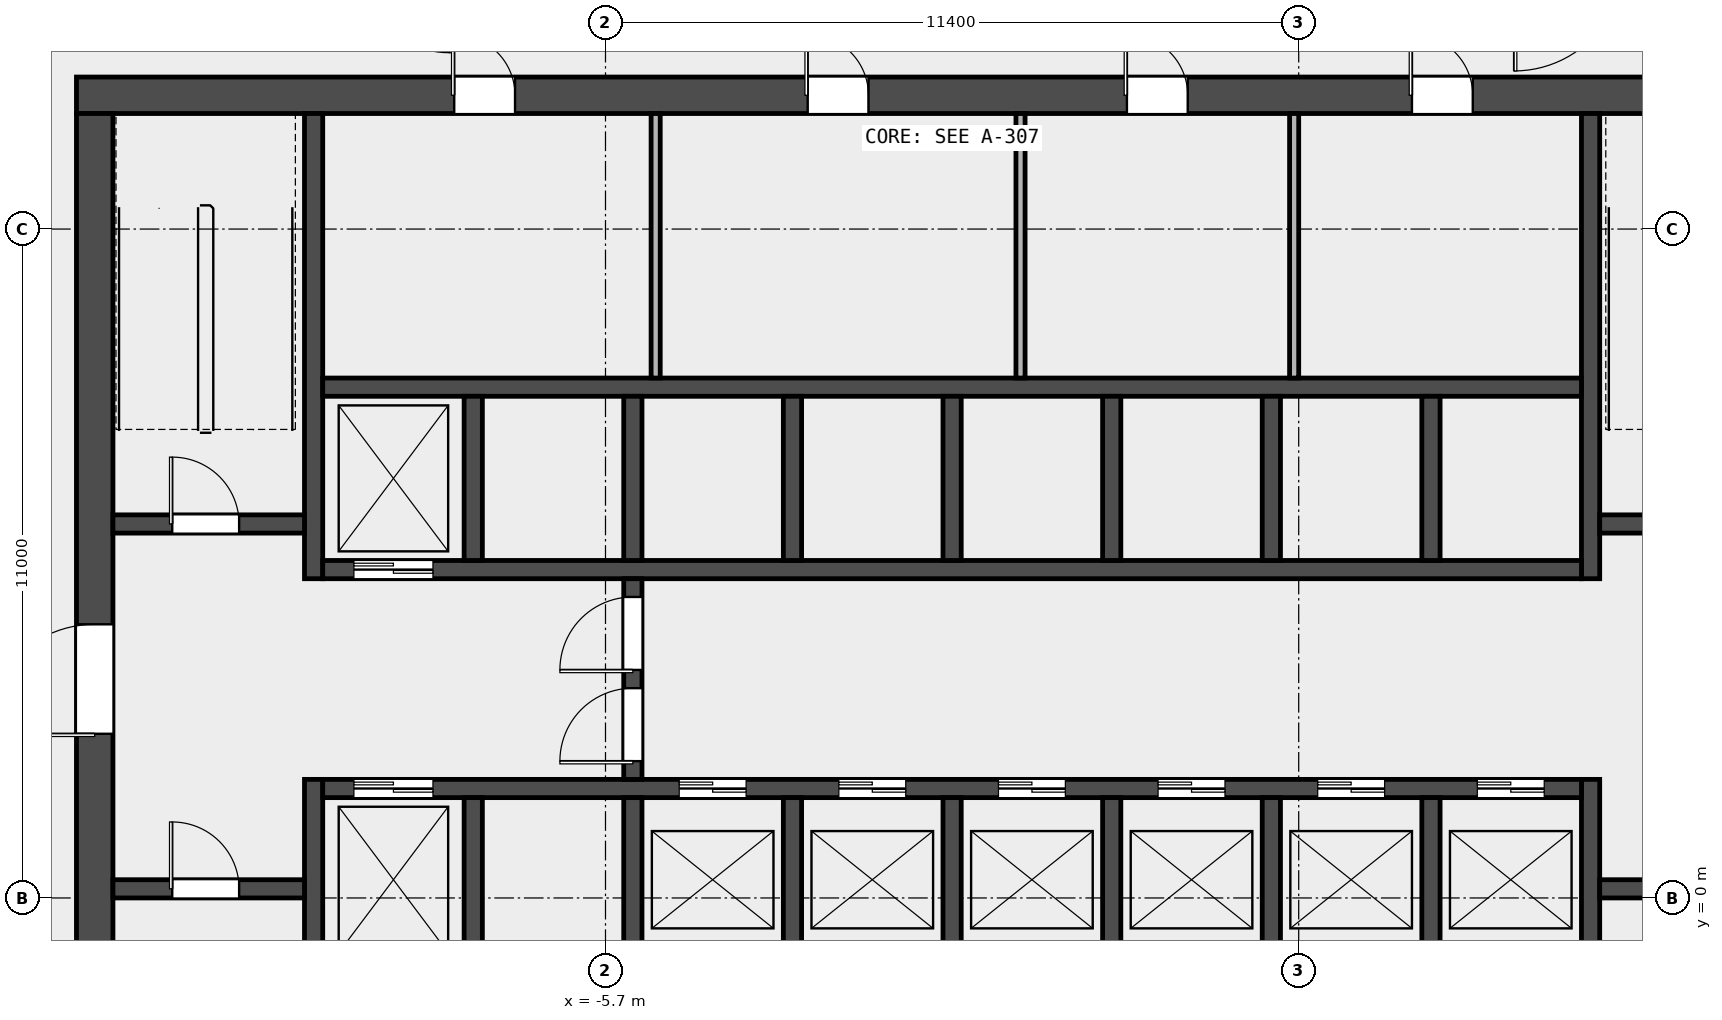
"""IFC4 building model, lengths in metres.
Left out: names, types, materials, properties, quantities, classifications, styles, units other than length and angle.
Written with IfcOpenShell. Run it as: python <this file> out.ifc"""

import sys

from ifc_helpers import new_model, si_unit, direction, frame, frame_2d, origin, place, context, subcontext, project, spatial, rectangle, extrude, element, fill, save


model = new_model("IFC4")
c1 = context("Model", 3, precision=1e-05, world=origin(), true_north=direction((0.0, 1.0)))
c2 = subcontext(c1, "Body", "Model", "MODEL_VIEW")
j1 = project(units=[si_unit("LENGTHUNIT", "METRE"), si_unit("PLANEANGLEUNIT", "RADIAN")], contexts=[c1])
p1 = place(None, origin())
s1 = spatial("IfcSite", under=j1, at=p1, CompositionType="ELEMENT")
p2 = place(p1, origin())
s2 = spatial("IfcBuilding", under=s1, at=p2, CompositionType="ELEMENT")
p3 = place(p2, frame((0.0, 0.0, 79.0)))
s3 = spatial("IfcBuildingStorey", under=s2, at=p3, CompositionType="ELEMENT", Elevation=79.0)
p4 = place(p3, frame((-14.4, 13.2, 0.0), z_axis=(0.0, 0.0, 1.0), x_axis=(1.0, 0.0, 0.0)))
e1 = element("IfcWall", 1, at=p4, inside=s3, PredefinedType="SHEAR", context=c2, shape_type="SweptSolid", body=[
    extrude(rectangle(XDim=28.8, YDim=0.6, at=frame_2d((14.4, 0.0))), origin(), (0.0, 0.0, 1.0), 4.5),
])
p5 = place(p4, frame((6.212, 0.0, 0.0)))
e2 = element("IfcOpeningElement", 2, at=p5, cuts=e1, PredefinedType="OPENING", context=c2, shape_type="SweptSolid", body=[
    extrude(rectangle(XDim=1.0, YDim=2.1, at=frame_2d((0.5, 1.05))), frame((0.0, 0.312, 0.0), z_axis=(0.0, -1.0, 0.0), x_axis=(1.0, 0.0, 0.0)), (0.0, 0.0, 1.0), 0.624),
])
p6 = place(p4, frame((12.025, 0.0, 0.0)))
e3 = element("IfcOpeningElement", 3, at=p6, cuts=e1, PredefinedType="OPENING", context=c2, shape_type="SweptSolid", body=[
    extrude(rectangle(XDim=1.0, YDim=2.1, at=frame_2d((0.5, 1.05))), frame((0.0, 0.312, 0.0), z_axis=(0.0, -1.0, 0.0), x_axis=(1.0, 0.0, 0.0)), (0.0, 0.0, 1.0), 0.624),
])
p7 = place(p4, frame((17.275, 0.0, 0.0)))
e4 = element("IfcOpeningElement", 4, at=p7, cuts=e1, PredefinedType="OPENING", context=c2, shape_type="SweptSolid", body=[
    extrude(rectangle(XDim=1.0, YDim=2.1, at=frame_2d((0.5, 1.05))), frame((0.0, 0.312, 0.0), z_axis=(0.0, -1.0, 0.0), x_axis=(1.0, 0.0, 0.0)), (0.0, 0.0, 1.0), 0.624),
])
p8 = place(p4, frame((21.962, 0.0, 0.0)))
e5 = element("IfcOpeningElement", 5, at=p8, cuts=e1, PredefinedType="OPENING", context=c2, shape_type="SweptSolid", body=[
    extrude(rectangle(XDim=1.0, YDim=2.1, at=frame_2d((0.5, 1.05))), frame((0.0, 0.312, 0.0), z_axis=(0.0, -1.0, 0.0), x_axis=(1.0, 0.0, 0.0)), (0.0, 0.0, 1.0), 0.624),
])
p9 = place(p3, frame((-14.1, -6.6, 0.0), z_axis=(0.0, 0.0, 1.0), x_axis=(0.0, 1.0, 0.0)))
e6 = element("IfcWall", 6, at=p9, inside=s3, PredefinedType="SHEAR", context=c2, shape_type="SweptSolid", body=[
    extrude(rectangle(XDim=19.5, YDim=0.6, at=frame_2d((9.75, 0.0))), origin(), (0.0, 0.0, 1.0), 4.5),
])
p10 = place(p9, frame((9.3, 0.0, 0.0)))
e7 = element("IfcOpeningElement", 7, at=p10, cuts=e6, PredefinedType="OPENING", context=c2, shape_type="SweptSolid", body=[
    extrude(rectangle(XDim=1.8, YDim=2.1, at=frame_2d((0.9, 1.05))), frame((0.0, 0.312, 0.0), z_axis=(0.0, -1.0, 0.0), x_axis=(1.0, 0.0, 0.0)), (0.0, 0.0, 1.0), 0.624),
])
p11 = place(p3, frame((-10.5, -6.6, 0.0), z_axis=(0.0, 0.0, 1.0), x_axis=(0.0, 1.0, 0.0)))
e8 = element("IfcWall", 8, at=p11, inside=s3, PredefinedType="SHEAR", context=c2, shape_type="SweptSolid", body=[
    extrude(rectangle(XDim=8.55, YDim=0.3, at=frame_2d((4.275, 0.0))), origin(), (0.0, 0.0, 1.0), 4.5),
])
p12 = place(p3, frame((-10.5, 5.25, 0.0), z_axis=(0.0, 0.0, 1.0), x_axis=(0.0, 1.0, 0.0)))
e9 = element("IfcWall", 9, at=p12, inside=s3, PredefinedType="SHEAR", context=c2, shape_type="SweptSolid", body=[
    extrude(rectangle(XDim=7.65, YDim=0.3, at=frame_2d((3.825, 0.0))), origin(), (0.0, 0.0, 1.0), 4.5),
])
p13 = place(p3, frame((10.5, -6.6, 0.0), z_axis=(0.0, 0.0, 1.0), x_axis=(0.0, 1.0, 0.0)))
e10 = element("IfcWall", 10, at=p13, inside=s3, PredefinedType="SHEAR", context=c2, shape_type="SweptSolid", body=[
    extrude(rectangle(XDim=8.55, YDim=0.3, at=frame_2d((4.275, 0.0))), origin(), (0.0, 0.0, 1.0), 4.5),
])
p14 = place(p3, frame((10.5, 5.25, 0.0), z_axis=(0.0, 0.0, 1.0), x_axis=(0.0, 1.0, 0.0)))
e11 = element("IfcWall", 11, at=p14, inside=s3, PredefinedType="SHEAR", context=c2, shape_type="SweptSolid", body=[
    extrude(rectangle(XDim=7.65, YDim=0.3, at=frame_2d((3.825, 0.0))), origin(), (0.0, 0.0, 1.0), 4.5),
])
p15 = place(p3, frame((-13.8, 0.15, 0.0), z_axis=(0.0, 0.0, 1.0), x_axis=(1.0, 0.0, 0.0)))
e12 = element("IfcWall", 12, at=p15, inside=s3, PredefinedType="SOLIDWALL", context=c2, shape_type="SweptSolid", body=[
    extrude(rectangle(XDim=3.15, YDim=0.3, at=frame_2d((1.575, 0.0))), origin(), (0.0, 0.0, 1.0), 4.5),
])
p16 = place(p15, frame((0.975, 0.0, 0.0)))
e13 = element("IfcOpeningElement", 13, at=p16, cuts=e12, PredefinedType="OPENING", context=c2, shape_type="SweptSolid", body=[
    extrude(rectangle(XDim=1.1, YDim=2.1, at=frame_2d((0.55, 1.05))), frame((0.0, 0.162, 0.0), z_axis=(0.0, -1.0, 0.0), x_axis=(1.0, 0.0, 0.0)), (0.0, 0.0, 1.0), 0.324),
])
p17 = place(p3, frame((-13.8, 6.15, 0.0), z_axis=(0.0, 0.0, 1.0), x_axis=(1.0, 0.0, 0.0)))
e14 = element("IfcWall", 14, at=p17, inside=s3, PredefinedType="SOLIDWALL", context=c2, shape_type="SweptSolid", body=[
    extrude(rectangle(XDim=3.15, YDim=0.3, at=frame_2d((1.575, 0.0))), origin(), (0.0, 0.0, 1.0), 4.5),
])
p18 = place(p17, frame((0.975, 0.0, 0.0)))
e15 = element("IfcOpeningElement", 15, at=p18, cuts=e14, PredefinedType="OPENING", context=c2, shape_type="SweptSolid", body=[
    extrude(rectangle(XDim=1.1, YDim=2.1, at=frame_2d((0.55, 1.05))), frame((0.0, 0.162, 0.0), z_axis=(0.0, -1.0, 0.0), x_axis=(1.0, 0.0, 0.0)), (0.0, 0.0, 1.0), 0.324),
])
p19 = place(p3, frame((10.65, 0.15, 0.0), z_axis=(0.0, 0.0, 1.0), x_axis=(1.0, 0.0, 0.0)))
e16 = element("IfcWall", 16, at=p19, inside=s3, PredefinedType="SOLIDWALL", context=c2, shape_type="SweptSolid", body=[
    extrude(rectangle(XDim=3.15, YDim=0.3, at=frame_2d((1.575, 0.0))), origin(), (0.0, 0.0, 1.0), 4.5),
])
p20 = place(p19, frame((1.025, 0.0, 0.0)))
e17 = element("IfcOpeningElement", 17, at=p20, cuts=e16, PredefinedType="OPENING", context=c2, shape_type="SweptSolid", body=[
    extrude(rectangle(XDim=1.1, YDim=2.1, at=frame_2d((0.55, 1.05))), frame((0.0, 0.162, 0.0), z_axis=(0.0, -1.0, 0.0), x_axis=(1.0, 0.0, 0.0)), (0.0, 0.0, 1.0), 0.324),
])
p21 = place(p3, frame((10.65, 6.15, 0.0), z_axis=(0.0, 0.0, 1.0), x_axis=(1.0, 0.0, 0.0)))
e18 = element("IfcWall", 18, at=p21, inside=s3, PredefinedType="SOLIDWALL", context=c2, shape_type="SweptSolid", body=[
    extrude(rectangle(XDim=3.15, YDim=0.3, at=frame_2d((1.575, 0.0))), origin(), (0.0, 0.0, 1.0), 4.5),
])
p22 = place(p21, frame((1.025, 0.0, 0.0)))
e19 = element("IfcOpeningElement", 19, at=p22, cuts=e18, PredefinedType="OPENING", context=c2, shape_type="SweptSolid", body=[
    extrude(rectangle(XDim=1.1, YDim=2.1, at=frame_2d((0.55, 1.05))), frame((0.0, 0.162, 0.0), z_axis=(0.0, -1.0, 0.0), x_axis=(1.0, 0.0, 0.0)), (0.0, 0.0, 1.0), 0.324),
])
p23 = place(p3, frame((-10.35, 1.8, 0.0), z_axis=(0.0, 0.0, 1.0), x_axis=(1.0, 0.0, 0.0)))
e20 = element("IfcWall", 20, at=p23, inside=s3, PredefinedType="SOLIDWALL", context=c2, shape_type="SweptSolid", body=[
    extrude(rectangle(XDim=20.7, YDim=0.3, at=frame_2d((10.35, 0.0))), origin(), (0.0, 0.0, 1.0), 4.5),
])
p24 = place(p23, frame((0.512, 0.0, 0.0)))
e21 = element("IfcOpeningElement", 21, at=p24, cuts=e20, PredefinedType="OPENING", context=c2, shape_type="SweptSolid", body=[
    extrude(rectangle(XDim=1.3, YDim=2.1, at=frame_2d((0.65, 1.05))), frame((0.0, 0.162, 0.0), z_axis=(0.0, -1.0, 0.0), x_axis=(1.0, 0.0, 0.0)), (0.0, 0.0, 1.0), 0.324),
])
p25 = place(p23, frame((5.863, 0.0, 0.0)))
e22 = element("IfcOpeningElement", 22, at=p25, cuts=e20, PredefinedType="OPENING", context=c2, shape_type="SweptSolid", body=[
    extrude(rectangle(XDim=1.1, YDim=2.1, at=frame_2d((0.55, 1.05))), frame((0.0, 0.162, 0.0), z_axis=(0.0, -1.0, 0.0), x_axis=(1.0, 0.0, 0.0)), (0.0, 0.0, 1.0), 0.324),
])
p26 = place(p23, frame((8.488, 0.0, 0.0)))
e23 = element("IfcOpeningElement", 23, at=p26, cuts=e20, PredefinedType="OPENING", context=c2, shape_type="SweptSolid", body=[
    extrude(rectangle(XDim=1.1, YDim=2.1, at=frame_2d((0.55, 1.05))), frame((0.0, 0.162, 0.0), z_axis=(0.0, -1.0, 0.0), x_axis=(1.0, 0.0, 0.0)), (0.0, 0.0, 1.0), 0.324),
])
p27 = place(p23, frame((11.113, 0.0, 0.0)))
e24 = element("IfcOpeningElement", 24, at=p27, cuts=e20, PredefinedType="OPENING", context=c2, shape_type="SweptSolid", body=[
    extrude(rectangle(XDim=1.1, YDim=2.1, at=frame_2d((0.55, 1.05))), frame((0.0, 0.162, 0.0), z_axis=(0.0, -1.0, 0.0), x_axis=(1.0, 0.0, 0.0)), (0.0, 0.0, 1.0), 0.324),
])
p28 = place(p23, frame((13.738, 0.0, 0.0)))
e25 = element("IfcOpeningElement", 25, at=p28, cuts=e20, PredefinedType="OPENING", context=c2, shape_type="SweptSolid", body=[
    extrude(rectangle(XDim=1.1, YDim=2.1, at=frame_2d((0.55, 1.05))), frame((0.0, 0.162, 0.0), z_axis=(0.0, -1.0, 0.0), x_axis=(1.0, 0.0, 0.0)), (0.0, 0.0, 1.0), 0.324),
])
p29 = place(p23, frame((16.363, 0.0, 0.0)))
e26 = element("IfcOpeningElement", 26, at=p29, cuts=e20, PredefinedType="OPENING", context=c2, shape_type="SweptSolid", body=[
    extrude(rectangle(XDim=1.1, YDim=2.1, at=frame_2d((0.55, 1.05))), frame((0.0, 0.162, 0.0), z_axis=(0.0, -1.0, 0.0), x_axis=(1.0, 0.0, 0.0)), (0.0, 0.0, 1.0), 0.324),
])
p30 = place(p23, frame((18.988, 0.0, 0.0)))
e27 = element("IfcOpeningElement", 27, at=p30, cuts=e20, PredefinedType="OPENING", context=c2, shape_type="SweptSolid", body=[
    extrude(rectangle(XDim=1.1, YDim=2.1, at=frame_2d((0.55, 1.05))), frame((0.0, 0.162, 0.0), z_axis=(0.0, -1.0, 0.0), x_axis=(1.0, 0.0, 0.0)), (0.0, 0.0, 1.0), 0.324),
])
p31 = place(p3, frame((-10.35, 5.4, 0.0), z_axis=(0.0, 0.0, 1.0), x_axis=(1.0, 0.0, 0.0)))
e28 = element("IfcWall", 28, at=p31, inside=s3, PredefinedType="SOLIDWALL", context=c2, shape_type="SweptSolid", body=[
    extrude(rectangle(XDim=20.7, YDim=0.3, at=frame_2d((10.35, 0.0))), origin(), (0.0, 0.0, 1.0), 4.5),
])
p32 = place(p31, frame((0.512, 0.0, 0.0)))
e29 = element("IfcOpeningElement", 29, at=p32, cuts=e28, PredefinedType="OPENING", context=c2, shape_type="SweptSolid", body=[
    extrude(rectangle(XDim=1.3, YDim=2.1, at=frame_2d((0.65, 1.05))), frame((0.0, 0.162, 0.0), z_axis=(0.0, -1.0, 0.0), x_axis=(1.0, 0.0, 0.0)), (0.0, 0.0, 1.0), 0.324),
])
p33 = place(p3, frame((-10.35, 8.4, 0.0), z_axis=(0.0, 0.0, 1.0), x_axis=(1.0, 0.0, 0.0)))
e30 = element("IfcWall", 30, at=p33, inside=s3, PredefinedType="SOLIDWALL", context=c2, shape_type="SweptSolid", body=[
    extrude(rectangle(XDim=20.7, YDim=0.3, at=frame_2d((10.35, 0.0))), origin(), (0.0, 0.0, 1.0), 4.5),
])
for number, where, z_axis, x_axis in (
    (31, (-7.875, -1.05, 0.0), (0.0, 0.0, 1.0), (0.0, 1.0, 0.0)),
    (32, (-5.25, -1.05, 0.0), (0.0, 0.0, 1.0), (0.0, 1.0, 0.0)),
    (33, (-2.625, -1.05, 0.0), (0.0, 0.0, 1.0), (0.0, 1.0, 0.0)),
    (34, (0.0, -1.05, 0.0), (0.0, 0.0, 1.0), (0.0, 1.0, 0.0)),
    (35, (2.625, -1.05, 0.0), (0.0, 0.0, 1.0), (0.0, 1.0, 0.0)),
    (36, (5.25, -1.05, 0.0), (0.0, 0.0, 1.0), (0.0, 1.0, 0.0)),
    (37, (7.875, -1.05, 0.0), (0.0, 0.0, 1.0), (0.0, 1.0, 0.0)),
    (38, (-7.875, 5.55, 0.0), (0.0, 0.0, 1.0), (0.0, 1.0, 0.0)),
    (39, (-5.25, 5.55, 0.0), (0.0, 0.0, 1.0), (0.0, 1.0, 0.0)),
    (40, (-2.625, 5.55, 0.0), (0.0, 0.0, 1.0), (0.0, 1.0, 0.0)),
    (41, (0.0, 5.55, 0.0), (0.0, 0.0, 1.0), (0.0, 1.0, 0.0)),
    (42, (2.625, 5.55, 0.0), (0.0, 0.0, 1.0), (0.0, 1.0, 0.0)),
    (43, (5.25, 5.55, 0.0), (0.0, 0.0, 1.0), (0.0, 1.0, 0.0)),
    (44, (7.875, 5.55, 0.0), (0.0, 0.0, 1.0), (0.0, 1.0, 0.0)),
):
    element("IfcWall", number, at=place(p3, frame(where, z_axis=z_axis, x_axis=x_axis)), inside=s3, PredefinedType="SOLIDWALL", context=c2, shape_type="SweptSolid", body=[
        extrude(rectangle(XDim=2.7, YDim=0.3, at=frame_2d((1.35, 0.0))), origin(), (0.0, 0.0, 1.0), 4.5),
    ])
p34 = place(p3, frame((-5.25, 1.95, 0.0), z_axis=(0.0, 0.0, 1.0), x_axis=(0.0, 1.0, 0.0)))
e45 = element("IfcWall", 45, at=p34, inside=s3, PredefinedType="SOLIDWALL", context=c2, shape_type="SweptSolid", body=[
    extrude(rectangle(XDim=3.3, YDim=0.3, at=frame_2d((1.65, 0.0))), origin(), (0.0, 0.0, 1.0), 4.5),
])
p35 = place(p34, frame((0.3, 0.0, 0.0)))
e46 = element("IfcOpeningElement", 46, at=p35, cuts=e45, PredefinedType="OPENING", context=c2, shape_type="SweptSolid", body=[
    extrude(rectangle(XDim=1.2, YDim=2.1, at=frame_2d((0.6, 1.05))), frame((0.0, 0.162, 0.0), z_axis=(0.0, -1.0, 0.0), x_axis=(1.0, 0.0, 0.0)), (0.0, 0.0, 1.0), 0.324),
])
p36 = place(p34, frame((1.8, 0.0, 0.0)))
e47 = element("IfcOpeningElement", 47, at=p36, cuts=e45, PredefinedType="OPENING", context=c2, shape_type="SweptSolid", body=[
    extrude(rectangle(XDim=1.2, YDim=2.1, at=frame_2d((0.6, 1.05))), frame((0.0, 0.162, 0.0), z_axis=(0.0, -1.0, 0.0), x_axis=(1.0, 0.0, 0.0)), (0.0, 0.0, 1.0), 0.324),
])
for number, where, z_axis, x_axis in (
    (48, (-4.875, 8.55, 0.0), (0.0, 0.0, 1.0), (0.0, 1.0, 0.0)),
    (49, (1.125, 8.55, 0.0), (0.0, 0.0, 1.0), (0.0, 1.0, 0.0)),
    (50, (5.625, 8.55, 0.0), (0.0, 0.0, 1.0), (0.0, 1.0, 0.0)),
):
    element("IfcWall", number, at=place(p3, frame(where, z_axis=z_axis, x_axis=x_axis)), inside=s3, PredefinedType="PARTITIONING", context=c2, shape_type="SweptSolid", body=[
        extrude(rectangle(XDim=4.35, YDim=0.15, at=frame_2d((2.175, 0.0))), origin(), (0.0, 0.0, 1.0), 4.5),
    ])
p37 = place(p16, origin())
e51 = element("IfcDoor", 51, at=p37, inside=s3, OperationType="SINGLE_SWING_LEFT", PredefinedType="DOOR", context=c2, shape_type="SweptSolid", body=[
    extrude(rectangle(XDim=1.1, YDim=2.1, at=frame_2d((0.55, 1.05))), frame((0.0, 0.025, 0.0), z_axis=(0.0, -1.0, 0.0), x_axis=(1.0, 0.0, 0.0)), (0.0, 0.0, 1.0), 0.05),
])
fill(e13, e51)
p38 = place(p18, origin())
e52 = element("IfcDoor", 52, at=p38, inside=s3, OperationType="SINGLE_SWING_LEFT", PredefinedType="DOOR", context=c2, shape_type="SweptSolid", body=[
    extrude(rectangle(XDim=1.1, YDim=2.1, at=frame_2d((0.55, 1.05))), frame((0.0, 0.025, 0.0), z_axis=(0.0, -1.0, 0.0), x_axis=(1.0, 0.0, 0.0)), (0.0, 0.0, 1.0), 0.05),
])
fill(e15, e52)
p39 = place(p10, origin())
e53 = element("IfcDoor", 53, at=p39, inside=s3, OperationType="DOUBLE_DOOR_SINGLE_SWING", PredefinedType="DOOR", context=c2, shape_type="SweptSolid", body=[
    extrude(rectangle(XDim=1.8, YDim=2.1, at=frame_2d((0.9, 1.05))), frame((0.0, 0.025, 0.0), z_axis=(0.0, -1.0, 0.0), x_axis=(1.0, 0.0, 0.0)), (0.0, 0.0, 1.0), 0.05),
])
fill(e7, e53)
p40 = place(p35, origin())
e54 = element("IfcDoor", 54, at=p40, inside=s3, OperationType="SINGLE_SWING_LEFT", PredefinedType="DOOR", context=c2, shape_type="SweptSolid", body=[
    extrude(rectangle(XDim=1.2, YDim=2.1, at=frame_2d((0.6, 1.05))), frame((0.0, 0.025, 0.0), z_axis=(0.0, -1.0, 0.0), x_axis=(1.0, 0.0, 0.0)), (0.0, 0.0, 1.0), 0.05),
])
fill(e46, e54)
p41 = place(p36, origin())
e55 = element("IfcDoor", 55, at=p41, inside=s3, OperationType="SINGLE_SWING_RIGHT", PredefinedType="DOOR", context=c2, shape_type="SweptSolid", body=[
    extrude(rectangle(XDim=1.2, YDim=2.1, at=frame_2d((0.6, 1.05))), frame((0.0, 0.025, 0.0), z_axis=(0.0, -1.0, 0.0), x_axis=(1.0, 0.0, 0.0)), (0.0, 0.0, 1.0), 0.05),
])
fill(e47, e55)
p42 = place(p24, origin())
e56 = element("IfcDoor", 56, at=p42, inside=s3, OperationType="DOUBLE_DOOR_SLIDING", PredefinedType="DOOR", context=c2, shape_type="SweptSolid", body=[
    extrude(rectangle(XDim=1.3, YDim=2.1, at=frame_2d((0.65, 1.05))), frame((0.0, 0.025, 0.0), z_axis=(0.0, -1.0, 0.0), x_axis=(1.0, 0.0, 0.0)), (0.0, 0.0, 1.0), 0.05),
])
fill(e21, e56)
p43 = place(p25, origin())
e57 = element("IfcDoor", 57, at=p43, inside=s3, OperationType="DOUBLE_DOOR_SLIDING", PredefinedType="DOOR", context=c2, shape_type="SweptSolid", body=[
    extrude(rectangle(XDim=1.1, YDim=2.1, at=frame_2d((0.55, 1.05))), frame((0.0, 0.025, 0.0), z_axis=(0.0, -1.0, 0.0), x_axis=(1.0, 0.0, 0.0)), (0.0, 0.0, 1.0), 0.05),
])
fill(e22, e57)
p44 = place(p26, origin())
e58 = element("IfcDoor", 58, at=p44, inside=s3, OperationType="DOUBLE_DOOR_SLIDING", PredefinedType="DOOR", context=c2, shape_type="SweptSolid", body=[
    extrude(rectangle(XDim=1.1, YDim=2.1, at=frame_2d((0.55, 1.05))), frame((0.0, 0.025, 0.0), z_axis=(0.0, -1.0, 0.0), x_axis=(1.0, 0.0, 0.0)), (0.0, 0.0, 1.0), 0.05),
])
fill(e23, e58)
p45 = place(p27, origin())
e59 = element("IfcDoor", 59, at=p45, inside=s3, OperationType="DOUBLE_DOOR_SLIDING", PredefinedType="DOOR", context=c2, shape_type="SweptSolid", body=[
    extrude(rectangle(XDim=1.1, YDim=2.1, at=frame_2d((0.55, 1.05))), frame((0.0, 0.025, 0.0), z_axis=(0.0, -1.0, 0.0), x_axis=(1.0, 0.0, 0.0)), (0.0, 0.0, 1.0), 0.05),
])
fill(e24, e59)
p46 = place(p28, origin())
e60 = element("IfcDoor", 60, at=p46, inside=s3, OperationType="DOUBLE_DOOR_SLIDING", PredefinedType="DOOR", context=c2, shape_type="SweptSolid", body=[
    extrude(rectangle(XDim=1.1, YDim=2.1, at=frame_2d((0.55, 1.05))), frame((0.0, 0.025, 0.0), z_axis=(0.0, -1.0, 0.0), x_axis=(1.0, 0.0, 0.0)), (0.0, 0.0, 1.0), 0.05),
])
fill(e25, e60)
p47 = place(p29, origin())
e61 = element("IfcDoor", 61, at=p47, inside=s3, OperationType="DOUBLE_DOOR_SLIDING", PredefinedType="DOOR", context=c2, shape_type="SweptSolid", body=[
    extrude(rectangle(XDim=1.1, YDim=2.1, at=frame_2d((0.55, 1.05))), frame((0.0, 0.025, 0.0), z_axis=(0.0, -1.0, 0.0), x_axis=(1.0, 0.0, 0.0)), (0.0, 0.0, 1.0), 0.05),
])
fill(e26, e61)
p48 = place(p30, origin())
e62 = element("IfcDoor", 62, at=p48, inside=s3, OperationType="DOUBLE_DOOR_SLIDING", PredefinedType="DOOR", context=c2, shape_type="SweptSolid", body=[
    extrude(rectangle(XDim=1.1, YDim=2.1, at=frame_2d((0.55, 1.05))), frame((0.0, 0.025, 0.0), z_axis=(0.0, -1.0, 0.0), x_axis=(1.0, 0.0, 0.0)), (0.0, 0.0, 1.0), 0.05),
])
fill(e27, e62)
p49 = place(p32, origin())
e63 = element("IfcDoor", 63, at=p49, inside=s3, OperationType="DOUBLE_DOOR_SLIDING", PredefinedType="DOOR", context=c2, shape_type="SweptSolid", body=[
    extrude(rectangle(XDim=1.3, YDim=2.1, at=frame_2d((0.65, 1.05))), frame((0.0, 0.025, 0.0), z_axis=(0.0, -1.0, 0.0), x_axis=(1.0, 0.0, 0.0)), (0.0, 0.0, 1.0), 0.05),
])
fill(e29, e63)
p50 = place(p5, origin())
e64 = element("IfcDoor", 64, at=p50, inside=s3, OperationType="SINGLE_SWING_LEFT", PredefinedType="DOOR", context=c2, shape_type="SweptSolid", body=[
    extrude(rectangle(XDim=1.0, YDim=2.1, at=frame_2d((0.5, 1.05))), frame((0.0, 0.025, 0.0), z_axis=(0.0, -1.0, 0.0), x_axis=(1.0, 0.0, 0.0)), (0.0, 0.0, 1.0), 0.05),
])
fill(e2, e64)
p51 = place(p6, origin())
e65 = element("IfcDoor", 65, at=p51, inside=s3, OperationType="SINGLE_SWING_LEFT", PredefinedType="DOOR", context=c2, shape_type="SweptSolid", body=[
    extrude(rectangle(XDim=1.0, YDim=2.1, at=frame_2d((0.5, 1.05))), frame((0.0, 0.025, 0.0), z_axis=(0.0, -1.0, 0.0), x_axis=(1.0, 0.0, 0.0)), (0.0, 0.0, 1.0), 0.05),
])
fill(e3, e65)
p52 = place(p7, origin())
e66 = element("IfcDoor", 66, at=p52, inside=s3, OperationType="SINGLE_SWING_LEFT", PredefinedType="DOOR", context=c2, shape_type="SweptSolid", body=[
    extrude(rectangle(XDim=1.0, YDim=2.1, at=frame_2d((0.5, 1.05))), frame((0.0, 0.025, 0.0), z_axis=(0.0, -1.0, 0.0), x_axis=(1.0, 0.0, 0.0)), (0.0, 0.0, 1.0), 0.05),
])
fill(e4, e66)
p53 = place(p8, origin())
e67 = element("IfcDoor", 67, at=p53, inside=s3, OperationType="SINGLE_SWING_LEFT", PredefinedType="DOOR", context=c2, shape_type="SweptSolid", body=[
    extrude(rectangle(XDim=1.0, YDim=2.1, at=frame_2d((0.5, 1.05))), frame((0.0, 0.025, 0.0), z_axis=(0.0, -1.0, 0.0), x_axis=(1.0, 0.0, 0.0)), (0.0, 0.0, 1.0), 0.05),
])
fill(e5, e67)
save(model, sys.argv[1])
